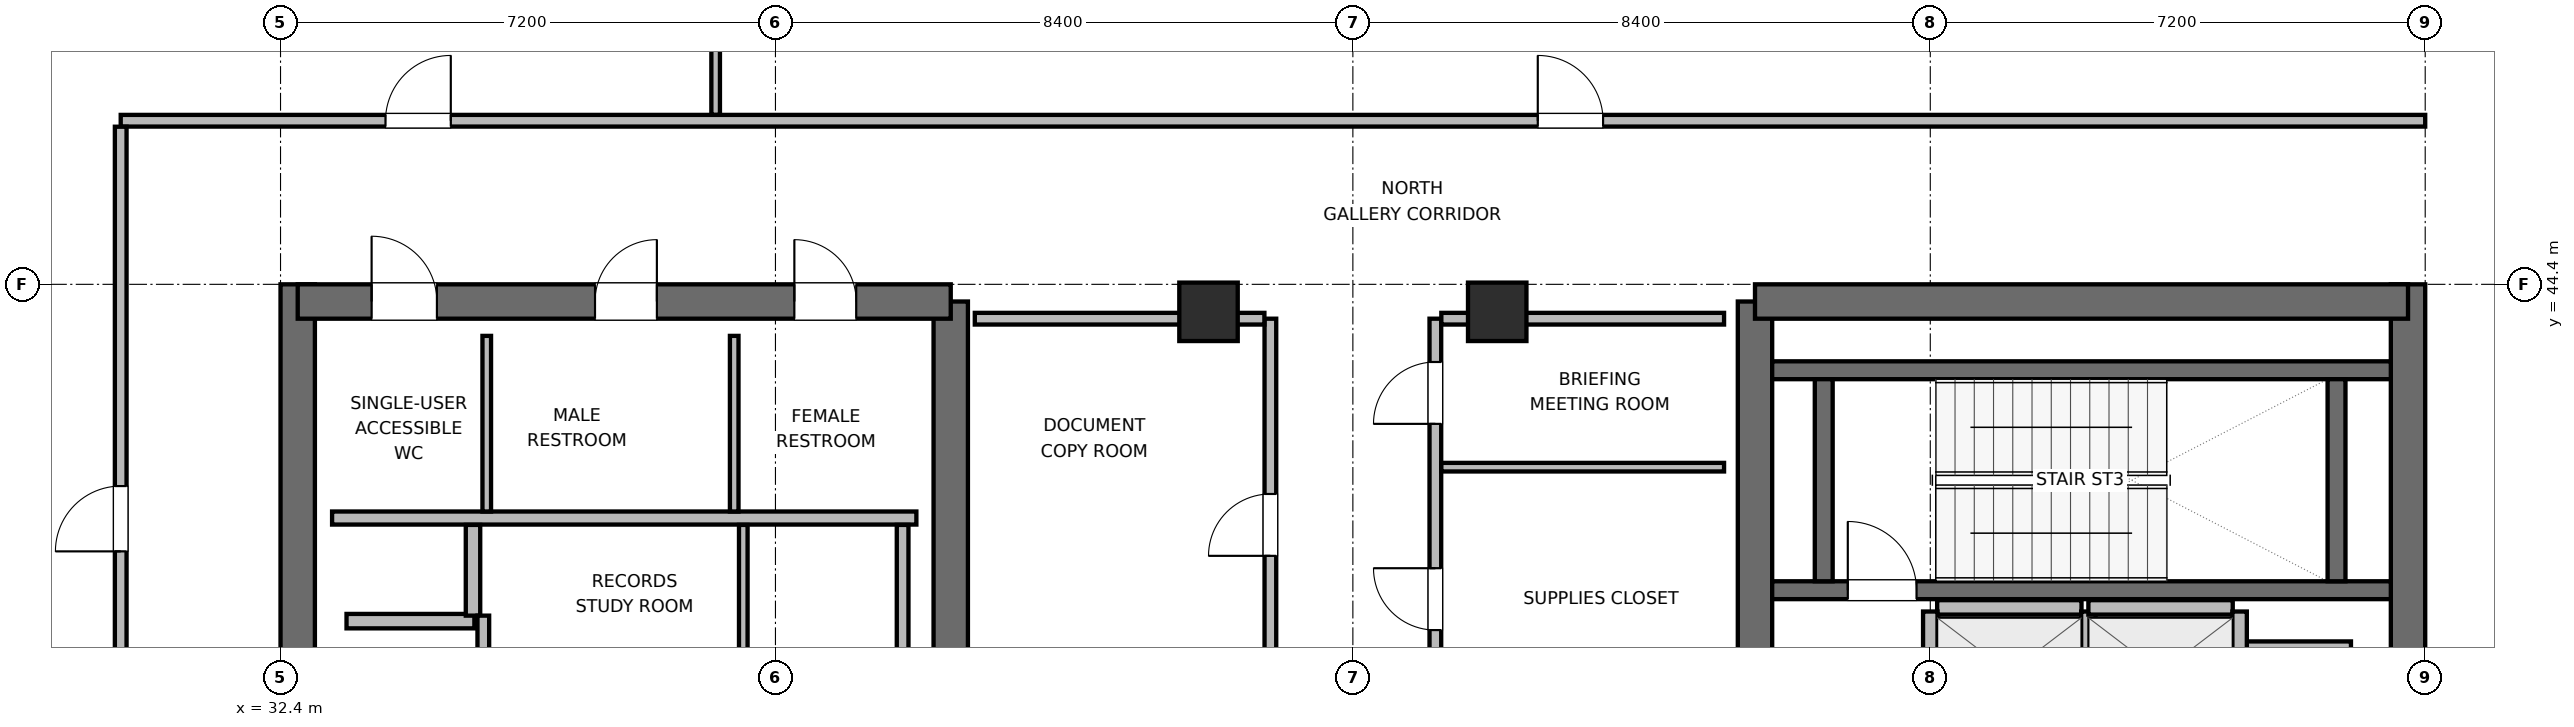
"""IFC4 building model, lengths in metres.
Left out: names, types, materials, properties, quantities, classifications, styles, units other than length and angle.
Written with IfcOpenShell. Run it as: python <this file> out.ifc"""

import sys

from ifc_helpers import new_model, si_unit, direction, frame, frame_2d, origin, origin_2d, place, context, subcontext, project, spatial, rectangle, extrude, element, fill, save


model = new_model("IFC4")
c1 = context("Model", 3, precision=1e-05, world=origin(), true_north=direction((0.0, 1.0)))
c2 = subcontext(c1, "Body", "Model", "MODEL_VIEW")
j1 = project(units=[si_unit("LENGTHUNIT", "METRE"), si_unit("PLANEANGLEUNIT", "RADIAN")], contexts=[c1])
p1 = place(None, origin())
s1 = spatial("IfcSite", under=j1, at=p1, CompositionType="ELEMENT")
p2 = place(p1, origin())
s2 = spatial("IfcBuilding", under=s1, at=p2, CompositionType="ELEMENT")
p3 = place(p2, frame((0.0, 0.0, 337.5)))
s3 = spatial("IfcBuildingStorey", under=s2, at=p3, CompositionType="ELEMENT", Elevation=337.5)
p4 = place(p3, frame((32.65, 27.6, 0.0), z_axis=(0.0, 0.0, 1.0), x_axis=(0.0, 1.0, 0.0)))
e1 = element("IfcWall", 1, at=p4, inside=s3, PredefinedType="SHEAR", context=c2, shape_type="SweptSolid", body=[
    extrude(rectangle(XDim=16.8, YDim=0.5, at=frame_2d((8.4, 0.0))), origin(), (0.0, 0.0, 1.0), 4.5),
])
p5 = place(p3, frame((42.15, 37.8, 0.0), z_axis=(0.0, 0.0, 1.0), x_axis=(0.0, 1.0, 0.0)))
e2 = element("IfcWall", 2, at=p5, inside=s3, PredefinedType="SHEAR", context=c2, shape_type="SweptSolid", body=[
    extrude(rectangle(XDim=6.35, YDim=0.5, at=frame_2d((3.175, 0.0))), origin(), (0.0, 0.0, 1.0), 4.5),
])
p6 = place(p3, frame((32.65, 44.15, 0.0), z_axis=(0.0, 0.0, 1.0), x_axis=(1.0, 0.0, 0.0)))
e3 = element("IfcWall", 3, at=p6, inside=s3, PredefinedType="SHEAR", context=c2, shape_type="SweptSolid", body=[
    extrude(rectangle(XDim=9.5, YDim=0.5, at=frame_2d((4.75, 0.0))), origin(), (0.0, 0.0, 1.0), 4.5),
])
p7 = place(p6, frame((1.075, 0.0, 0.0)))
e4 = element("IfcOpeningElement", 4, at=p7, cuts=e3, PredefinedType="OPENING", context=c2, shape_type="SweptSolid", body=[
    extrude(rectangle(XDim=0.95, YDim=2.04, at=frame_2d((0.475, 1.02))), frame((0.0, 0.26, 0.0), z_axis=(0.0, -1.0, 0.0), x_axis=(1.0, 0.0, 0.0)), (0.0, 0.0, 1.0), 0.52),
])
p8 = place(p6, frame((4.325, 0.0, 0.0)))
e5 = element("IfcOpeningElement", 5, at=p8, cuts=e3, PredefinedType="OPENING", context=c2, shape_type="SweptSolid", body=[
    extrude(rectangle(XDim=0.9, YDim=2.02, at=frame_2d((0.45, 1.01))), frame((0.0, 0.26, 0.0), z_axis=(0.0, -1.0, 0.0), x_axis=(1.0, 0.0, 0.0)), (0.0, 0.0, 1.0), 0.52),
])
p9 = place(p6, frame((7.225, 0.0, 0.0)))
e6 = element("IfcOpeningElement", 6, at=p9, cuts=e3, PredefinedType="OPENING", context=c2, shape_type="SweptSolid", body=[
    extrude(rectangle(XDim=0.9, YDim=2.02, at=frame_2d((0.45, 1.01))), frame((0.0, 0.26, 0.0), z_axis=(0.0, -1.0, 0.0), x_axis=(1.0, 0.0, 0.0)), (0.0, 0.0, 1.0), 0.52),
])
p10 = place(p3, frame((53.85, 38.0, 0.0), z_axis=(0.0, 0.0, 1.0), x_axis=(0.0, 1.0, 0.0)))
e7 = element("IfcWall", 7, at=p10, inside=s3, PredefinedType="SHEAR", context=c2, shape_type="SweptSolid", body=[
    extrude(rectangle(XDim=6.15, YDim=0.5, at=frame_2d((3.075, 0.0))), origin(), (0.0, 0.0, 1.0), 4.5),
])
p11 = place(p3, frame((63.35, 27.6, 0.0), z_axis=(0.0, 0.0, 1.0), x_axis=(0.0, 1.0, 0.0)))
e8 = element("IfcWall", 8, at=p11, inside=s3, PredefinedType="SHEAR", context=c2, shape_type="SweptSolid", body=[
    extrude(rectangle(XDim=16.8, YDim=0.5, at=frame_2d((8.4, 0.0))), origin(), (0.0, 0.0, 1.0), 4.5),
])
p12 = place(p3, frame((53.85, 44.15, 0.0), z_axis=(0.0, 0.0, 1.0), x_axis=(1.0, 0.0, 0.0)))
e9 = element("IfcWall", 9, at=p12, inside=s3, PredefinedType="SHEAR", context=c2, shape_type="SweptSolid", body=[
    extrude(rectangle(XDim=9.5, YDim=0.5, at=frame_2d((4.75, 0.0))), origin(), (0.0, 0.0, 1.0), 4.5),
])
p13 = place(p3, frame((54.1, 39.95, 0.0), z_axis=(0.0, 0.0, 1.0), x_axis=(1.0, 0.0, 0.0)))
e10 = element("IfcWall", 10, at=p13, inside=s3, PredefinedType="SHEAR", context=c2, shape_type="SweptSolid", body=[
    extrude(rectangle(XDim=9.0, YDim=0.26, at=frame_2d((4.5, 0.0))), origin(), (0.0, 0.0, 1.0), 4.5),
])
p14 = place(p13, frame((1.1, 0.0, 0.0)))
e11 = element("IfcOpeningElement", 11, at=p14, cuts=e10, PredefinedType="OPENING", context=c2, shape_type="SweptSolid", body=[
    extrude(rectangle(XDim=1.0, YDim=2.04, at=frame_2d((0.5, 1.02))), frame((0.0, 0.14, 0.0), z_axis=(0.0, -1.0, 0.0), x_axis=(1.0, 0.0, 0.0)), (0.0, 0.0, 1.0), 0.28),
])
p15 = place(p3, frame((54.1, 43.15, 0.0), z_axis=(0.0, 0.0, 1.0), x_axis=(1.0, 0.0, 0.0)))
e12 = element("IfcWall", 12, at=p15, inside=s3, PredefinedType="SHEAR", context=c2, shape_type="SweptSolid", body=[
    extrude(rectangle(XDim=9.0, YDim=0.26, at=frame_2d((4.5, 0.0))), origin(), (0.0, 0.0, 1.0), 4.5),
])
for number, where, z_axis, x_axis in (
    (13, (54.85, 40.08, 0.0), (0.0, 0.0, 1.0), (0.0, 1.0, 0.0)),
    (14, (62.31, 40.08, 0.0), (0.0, 0.0, 1.0), (0.0, 1.0, 0.0)),
):
    element("IfcWall", number, at=place(p3, frame(where, z_axis=z_axis, x_axis=x_axis)), inside=s3, PredefinedType="SHEAR", context=c2, shape_type="SweptSolid", body=[
        extrude(rectangle(XDim=2.94, YDim=0.26, at=frame_2d((1.47, 0.0))), origin(), (0.0, 0.0, 1.0), 4.5),
    ])
for number, where, z_axis, x_axis in (
    (15, (45.9, 44.0, 0.0), (0.0, 0.0, 1.0), (1.0, 0.0, 0.0)),
    (16, (50.1, 44.0, 0.0), (0.0, 0.0, 1.0), (1.0, 0.0, 0.0)),
):
    element("IfcColumn", number, at=place(p3, frame(where, z_axis=z_axis, x_axis=x_axis)), inside=s3, PredefinedType="COLUMN", context=c2, shape_type="SweptSolid", body=[
        extrude(rectangle(XDim=0.85, YDim=0.85, at=origin_2d()), origin(), (0.0, 0.0, 1.0), 4.5),
    ])
p16 = place(p3, frame((33.15, 41.0, 0.0), z_axis=(0.0, 0.0, 1.0), x_axis=(1.0, 0.0, 0.0)))
e17 = element("IfcWall", 17, at=p16, inside=s3, PredefinedType="PLUMBINGWALL", context=c2, shape_type="SweptSolid", body=[
    extrude(rectangle(XDim=8.5, YDim=0.19, at=frame_2d((4.25, 0.0))), origin(), (0.0, 0.0, 1.0), 4.28),
])
for number, where, z_axis, x_axis in (
    (18, (35.4, 41.095, 0.0), (0.0, 0.0, 1.0), (0.0, 1.0, 0.0)),
    (19, (39.0, 41.095, 0.0), (0.0, 0.0, 1.0), (0.0, 1.0, 0.0)),
):
    element("IfcWall", number, at=place(p3, frame(where, z_axis=z_axis, x_axis=x_axis)), inside=s3, PredefinedType="PARTITIONING", context=c2, shape_type="SweptSolid", body=[
        extrude(rectangle(XDim=2.555, YDim=0.125, at=frame_2d((1.277, 0.0))), origin(), (0.0, 0.0, 1.0), 4.28),
    ])
p17 = place(p3, frame((33.36, 39.5, 0.0), z_axis=(0.0, 0.0, 1.0), x_axis=(1.0, 0.0, 0.0)))
e20 = element("IfcWall", 20, at=p17, inside=s3, PredefinedType="PARTITIONING", context=c2, shape_type="SweptSolid", body=[
    extrude(rectangle(XDim=1.86, YDim=0.21, at=frame_2d((0.93, 0.0))), origin(), (0.0, 0.0, 1.0), 4.28),
])
p18 = place(p3, frame((35.2, 39.58, 0.0), z_axis=(0.0, 0.0, 1.0), x_axis=(0.0, 1.0, 0.0)))
e21 = element("IfcWall", 21, at=p18, inside=s3, PredefinedType="PARTITIONING", context=c2, shape_type="SweptSolid", body=[
    extrude(rectangle(XDim=1.32, YDim=0.21, at=frame_2d((0.66, 0.0))), origin(), (0.0, 0.0, 1.0), 4.28),
])
p19 = place(p3, frame((60.72, 39.1, 0.0), z_axis=(0.0, 0.0, 1.0), x_axis=(1.0, 0.0, 0.0)))
e22 = element("IfcWall", 22, at=p19, inside=s3, PredefinedType="PARTITIONING", context=c2, shape_type="SweptSolid", body=[
    extrude(rectangle(XDim=1.8, YDim=0.21, at=frame_2d((0.9, 0.0))), origin(), (0.0, 0.0, 1.0), 4.28),
])
p20 = place(p3, frame((56.5, 39.7, 0.0), z_axis=(0.0, 0.0, 1.0), x_axis=(1.0, 0.0, 0.0)))
e23 = element("IfcWall", 23, at=p20, inside=s3, PredefinedType="PARTITIONING", context=c2, shape_type="SweptSolid", body=[
    extrude(rectangle(XDim=2.1, YDim=0.21, at=frame_2d((1.05, 0.0))), origin(), (0.0, 0.0, 1.0), 4.28),
])
for number, where, z_axis, x_axis in (
    (24, (56.4, 37.86, 0.0), (0.0, 0.0, 1.0), (0.0, 1.0, 0.0)),
    (25, (58.7, 37.86, 0.0), (0.0, 0.0, 1.0), (0.0, 1.0, 0.0)),
):
    element("IfcWall", number, at=place(p3, frame(where, z_axis=z_axis, x_axis=x_axis)), inside=s3, PredefinedType="PARTITIONING", context=c2, shape_type="SweptSolid", body=[
        extrude(rectangle(XDim=1.78, YDim=0.21, at=frame_2d((0.89, 0.0))), origin(), (0.0, 0.0, 1.0), 4.28),
    ])
p21 = place(p3, frame((58.7, 39.7, 0.0), z_axis=(0.0, 0.0, 1.0), x_axis=(1.0, 0.0, 0.0)))
e26 = element("IfcWall", 26, at=p21, inside=s3, PredefinedType="PARTITIONING", context=c2, shape_type="SweptSolid", body=[
    extrude(rectangle(XDim=2.1, YDim=0.21, at=frame_2d((1.05, 0.0))), origin(), (0.0, 0.0, 1.0), 4.28),
])
p22 = place(p3, frame((60.9, 37.86, 0.0), z_axis=(0.0, 0.0, 1.0), x_axis=(0.0, 1.0, 0.0)))
e27 = element("IfcWall", 27, at=p22, inside=s3, PredefinedType="PARTITIONING", context=c2, shape_type="SweptSolid", body=[
    extrude(rectangle(XDim=1.78, YDim=0.21, at=frame_2d((0.89, 0.0))), origin(), (0.0, 0.0, 1.0), 4.28),
])
p23 = place(p3, frame((35.35, 38.087, 0.0), z_axis=(0.0, 0.0, 1.0), x_axis=(0.0, 1.0, 0.0)))
e28 = element("IfcWall", 28, at=p23, inside=s3, PredefinedType="PARTITIONING", context=c2, shape_type="SweptSolid", body=[
    extrude(rectangle(XDim=1.493, YDim=0.17, at=frame_2d((0.747, 0.0))), origin(), (0.0, 0.0, 1.0), 4.28),
])
p24 = place(p3, frame((41.45, 38.087, 0.0), z_axis=(0.0, 0.0, 1.0), x_axis=(0.0, 1.0, 0.0)))
e29 = element("IfcWall", 29, at=p24, inside=s3, PredefinedType="PARTITIONING", context=c2, shape_type="SweptSolid", body=[
    extrude(rectangle(XDim=2.813, YDim=0.17, at=frame_2d((1.406, 0.0))), origin(), (0.0, 0.0, 1.0), 4.28),
])
p25 = place(p3, frame((39.132, 38.087, 0.0), z_axis=(0.0, 0.0, 1.0), x_axis=(0.0, 1.0, 0.0)))
e30 = element("IfcWall", 30, at=p25, inside=s3, PredefinedType="PARTITIONING", context=c2, shape_type="SweptSolid", body=[
    extrude(rectangle(XDim=2.813, YDim=0.125, at=frame_2d((1.406, 0.0))), origin(), (0.0, 0.0, 1.0), 4.28),
])
p26 = place(p3, frame((46.8, 37.9, 0.0), z_axis=(0.0, 0.0, 1.0), x_axis=(0.0, 1.0, 0.0)))
e31 = element("IfcWall", 31, at=p26, inside=s3, PredefinedType="PARTITIONING", context=c2, shape_type="SweptSolid", body=[
    extrude(rectangle(XDim=6.0, YDim=0.17, at=frame_2d((3.0, 0.0))), origin(), (0.0, 0.0, 1.0), 4.28),
])
p27 = place(p26, frame((2.55, 0.0, 0.0)))
e32 = element("IfcOpeningElement", 32, at=p27, cuts=e31, PredefinedType="OPENING", context=c2, shape_type="SweptSolid", body=[
    extrude(rectangle(XDim=0.9, YDim=2.02, at=frame_2d((0.45, 1.01))), frame((0.0, 0.095, 0.0), z_axis=(0.0, -1.0, 0.0), x_axis=(1.0, 0.0, 0.0)), (0.0, 0.0, 1.0), 0.19),
])
p28 = place(p3, frame((42.5, 43.9, 0.0), z_axis=(0.0, 0.0, 1.0), x_axis=(1.0, 0.0, 0.0)))
e33 = element("IfcWall", 33, at=p28, inside=s3, PredefinedType="PARTITIONING", context=c2, shape_type="SweptSolid", body=[
    extrude(rectangle(XDim=4.213, YDim=0.17, at=frame_2d((2.106, 0.0))), origin(), (0.0, 0.0, 1.0), 3.365),
])
p29 = place(p3, frame((49.2, 37.9, 0.0), z_axis=(0.0, 0.0, 1.0), x_axis=(0.0, 1.0, 0.0)))
e34 = element("IfcWall", 34, at=p29, inside=s3, PredefinedType="PARTITIONING", context=c2, shape_type="SweptSolid", body=[
    extrude(rectangle(XDim=6.0, YDim=0.17, at=frame_2d((3.0, 0.0))), origin(), (0.0, 0.0, 1.0), 4.28),
])
p30 = place(p29, frame((1.47, 0.0, 0.0)))
e35 = element("IfcOpeningElement", 35, at=p30, cuts=e34, PredefinedType="OPENING", context=c2, shape_type="SweptSolid", body=[
    extrude(rectangle(XDim=0.9, YDim=2.02, at=frame_2d((0.45, 1.01))), frame((0.0, 0.095, 0.0), z_axis=(0.0, -1.0, 0.0), x_axis=(1.0, 0.0, 0.0)), (0.0, 0.0, 1.0), 0.19),
])
p31 = place(p29, frame((4.47, 0.0, 0.0)))
e36 = element("IfcOpeningElement", 36, at=p31, cuts=e34, PredefinedType="OPENING", context=c2, shape_type="SweptSolid", body=[
    extrude(rectangle(XDim=0.9, YDim=2.02, at=frame_2d((0.45, 1.01))), frame((0.0, 0.095, 0.0), z_axis=(0.0, -1.0, 0.0), x_axis=(1.0, 0.0, 0.0)), (0.0, 0.0, 1.0), 0.19),
])
p32 = place(p3, frame((49.287, 43.9, 0.0), z_axis=(0.0, 0.0, 1.0), x_axis=(1.0, 0.0, 0.0)))
e37 = element("IfcWall", 37, at=p32, inside=s3, PredefinedType="PARTITIONING", context=c2, shape_type="SweptSolid", body=[
    extrude(rectangle(XDim=4.113, YDim=0.17, at=frame_2d((2.056, 0.0))), origin(), (0.0, 0.0, 1.0), 3.365),
])
p33 = place(p3, frame((49.287, 41.74, 0.0), z_axis=(0.0, 0.0, 1.0), x_axis=(1.0, 0.0, 0.0)))
e38 = element("IfcWall", 38, at=p33, inside=s3, PredefinedType="PARTITIONING", context=c2, shape_type="SweptSolid", body=[
    extrude(rectangle(XDim=4.113, YDim=0.125, at=frame_2d((2.056, 0.0))), origin(), (0.0, 0.0, 1.0), 4.28),
])
p34 = place(p3, frame((30.075, 46.78, 0.0), z_axis=(0.0, 0.0, 1.0), x_axis=(1.0, 0.0, 0.0)))
e39 = element("IfcWall", 39, at=p34, inside=s3, PredefinedType="PARTITIONING", context=c2, shape_type="SweptSolid", body=[
    extrude(rectangle(XDim=33.525, YDim=0.17, at=frame_2d((16.763, 0.0))), origin(), (0.0, 0.0, 1.0), 4.28),
])
p35 = place(p34, frame((3.852, 0.0, 0.0)))
e40 = element("IfcOpeningElement", 40, at=p35, cuts=e39, PredefinedType="OPENING", context=c2, shape_type="SweptSolid", body=[
    extrude(rectangle(XDim=0.95, YDim=2.04, at=frame_2d((0.475, 1.02))), frame((0.0, 0.095, 0.0), z_axis=(0.0, -1.0, 0.0), x_axis=(1.0, 0.0, 0.0)), (0.0, 0.0, 1.0), 0.19),
])
p36 = place(p34, frame((20.615, 0.0, 0.0)))
e41 = element("IfcOpeningElement", 41, at=p36, cuts=e39, PredefinedType="OPENING", context=c2, shape_type="SweptSolid", body=[
    extrude(rectangle(XDim=0.95, YDim=2.04, at=frame_2d((0.475, 1.02))), frame((0.0, 0.095, 0.0), z_axis=(0.0, -1.0, 0.0), x_axis=(1.0, 0.0, 0.0)), (0.0, 0.0, 1.0), 0.19),
])
p37 = place(p3, frame((30.075, 25.307, 0.0), z_axis=(0.0, 0.0, 1.0), x_axis=(0.0, 1.0, 0.0)))
e42 = element("IfcWall", 42, at=p37, inside=s3, PredefinedType="PARTITIONING", context=c2, shape_type="SweptSolid", body=[
    extrude(rectangle(XDim=21.386, YDim=0.17, at=frame_2d((10.693, 0.0))), origin(), (0.0, 0.0, 1.0), 4.28),
])
p38 = place(p37, frame((4.428, 0.0, 0.0)))
e43 = element("IfcOpeningElement", 43, at=p38, cuts=e42, PredefinedType="OPENING", context=c2, shape_type="SweptSolid", body=[
    extrude(rectangle(XDim=0.95, YDim=2.04, at=frame_2d((0.475, 1.02))), frame((0.0, 0.095, 0.0), z_axis=(0.0, -1.0, 0.0), x_axis=(1.0, 0.0, 0.0)), (0.0, 0.0, 1.0), 0.19),
])
p39 = place(p37, frame((15.208, 0.0, 0.0)))
e44 = element("IfcOpeningElement", 44, at=p39, cuts=e42, PredefinedType="OPENING", context=c2, shape_type="SweptSolid", body=[
    extrude(rectangle(XDim=0.95, YDim=2.04, at=frame_2d((0.475, 1.02))), frame((0.0, 0.095, 0.0), z_axis=(0.0, -1.0, 0.0), x_axis=(1.0, 0.0, 0.0)), (0.0, 0.0, 1.0), 0.19),
])
p40 = place(p3, frame((38.73, 46.867, 0.0), z_axis=(0.0, 0.0, 1.0), x_axis=(0.0, 1.0, 0.0)))
e45 = element("IfcWall", 45, at=p40, inside=s3, PredefinedType="PARTITIONING", context=c2, shape_type="SweptSolid", body=[
    extrude(rectangle(XDim=6.298, YDim=0.125, at=frame_2d((3.149, 0.0))), origin(), (0.0, 0.0, 1.0), 4.28),
])
p41 = place(p14, origin())
e46 = element("IfcDoor", 46, at=p41, inside=s3, OperationType="SINGLE_SWING_LEFT", PredefinedType="DOOR", context=c2, shape_type="SweptSolid", body=[
    extrude(rectangle(XDim=1.0, YDim=2.04, at=frame_2d((0.5, 1.02))), frame((0.0, 0.025, 0.0), z_axis=(0.0, -1.0, 0.0), x_axis=(1.0, 0.0, 0.0)), (0.0, 0.0, 1.0), 0.05),
])
fill(e11, e46)
p42 = place(p7, origin())
e47 = element("IfcDoor", 47, at=p42, inside=s3, OperationType="SINGLE_SWING_LEFT", PredefinedType="DOOR", context=c2, shape_type="SweptSolid", body=[
    extrude(rectangle(XDim=0.95, YDim=2.04, at=frame_2d((0.475, 1.02))), frame((0.0, 0.025, 0.0), z_axis=(0.0, -1.0, 0.0), x_axis=(1.0, 0.0, 0.0)), (0.0, 0.0, 1.0), 0.05),
])
fill(e4, e47)
p43 = place(p8, origin())
e48 = element("IfcDoor", 48, at=p43, inside=s3, OperationType="SINGLE_SWING_RIGHT", PredefinedType="DOOR", context=c2, shape_type="SweptSolid", body=[
    extrude(rectangle(XDim=0.9, YDim=2.02, at=frame_2d((0.45, 1.01))), frame((0.0, 0.025, 0.0), z_axis=(0.0, -1.0, 0.0), x_axis=(1.0, 0.0, 0.0)), (0.0, 0.0, 1.0), 0.05),
])
fill(e5, e48)
p44 = place(p9, origin())
e49 = element("IfcDoor", 49, at=p44, inside=s3, OperationType="SINGLE_SWING_LEFT", PredefinedType="DOOR", context=c2, shape_type="SweptSolid", body=[
    extrude(rectangle(XDim=0.9, YDim=2.02, at=frame_2d((0.45, 1.01))), frame((0.0, 0.025, 0.0), z_axis=(0.0, -1.0, 0.0), x_axis=(1.0, 0.0, 0.0)), (0.0, 0.0, 1.0), 0.05),
])
fill(e6, e49)
p45 = place(p27, origin())
e50 = element("IfcDoor", 50, at=p45, inside=s3, OperationType="SINGLE_SWING_LEFT", PredefinedType="DOOR", context=c2, shape_type="SweptSolid", body=[
    extrude(rectangle(XDim=0.9, YDim=2.02, at=frame_2d((0.45, 1.01))), frame((0.0, 0.025, 0.0), z_axis=(0.0, -1.0, 0.0), x_axis=(1.0, 0.0, 0.0)), (0.0, 0.0, 1.0), 0.05),
])
fill(e32, e50)
p46 = place(p30, origin())
e51 = element("IfcDoor", 51, at=p46, inside=s3, OperationType="SINGLE_SWING_RIGHT", PredefinedType="DOOR", context=c2, shape_type="SweptSolid", body=[
    extrude(rectangle(XDim=0.9, YDim=2.02, at=frame_2d((0.45, 1.01))), frame((0.0, 0.025, 0.0), z_axis=(0.0, -1.0, 0.0), x_axis=(1.0, 0.0, 0.0)), (0.0, 0.0, 1.0), 0.05),
])
fill(e35, e51)
p47 = place(p31, origin())
e52 = element("IfcDoor", 52, at=p47, inside=s3, OperationType="SINGLE_SWING_LEFT", PredefinedType="DOOR", context=c2, shape_type="SweptSolid", body=[
    extrude(rectangle(XDim=0.9, YDim=2.02, at=frame_2d((0.45, 1.01))), frame((0.0, 0.025, 0.0), z_axis=(0.0, -1.0, 0.0), x_axis=(1.0, 0.0, 0.0)), (0.0, 0.0, 1.0), 0.05),
])
fill(e36, e52)
p48 = place(p35, origin())
e53 = element("IfcDoor", 53, at=p48, inside=s3, OperationType="SINGLE_SWING_RIGHT", PredefinedType="DOOR", context=c2, shape_type="SweptSolid", body=[
    extrude(rectangle(XDim=0.95, YDim=2.04, at=frame_2d((0.475, 1.02))), frame((0.0, 0.025, 0.0), z_axis=(0.0, -1.0, 0.0), x_axis=(1.0, 0.0, 0.0)), (0.0, 0.0, 1.0), 0.05),
])
fill(e40, e53)
p49 = place(p36, origin())
e54 = element("IfcDoor", 54, at=p49, inside=s3, OperationType="SINGLE_SWING_LEFT", PredefinedType="DOOR", context=c2, shape_type="SweptSolid", body=[
    extrude(rectangle(XDim=0.95, YDim=2.04, at=frame_2d((0.475, 1.02))), frame((0.0, 0.025, 0.0), z_axis=(0.0, -1.0, 0.0), x_axis=(1.0, 0.0, 0.0)), (0.0, 0.0, 1.0), 0.05),
])
fill(e41, e54)
p50 = place(p39, origin())
e55 = element("IfcDoor", 55, at=p50, inside=s3, OperationType="SINGLE_SWING_LEFT", PredefinedType="DOOR", context=c2, shape_type="SweptSolid", body=[
    extrude(rectangle(XDim=0.95, YDim=2.04, at=frame_2d((0.475, 1.02))), frame((0.0, 0.025, 0.0), z_axis=(0.0, -1.0, 0.0), x_axis=(1.0, 0.0, 0.0)), (0.0, 0.0, 1.0), 0.05),
])
fill(e44, e55)
save(model, sys.argv[1])
